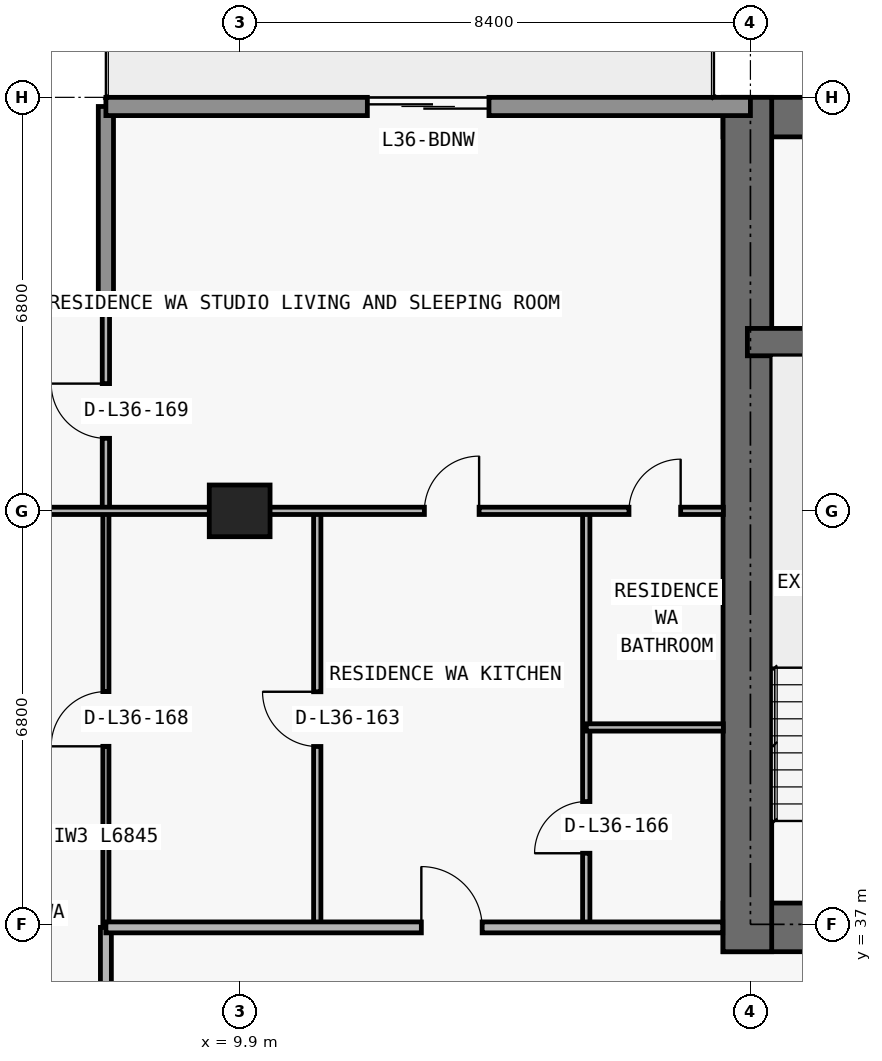
"""IFC4 building model, lengths in metres.
Left out: names, types, materials, properties, quantities, classifications, styles, units other than length and angle.
Written with IfcOpenShell. Run it as: python <this file> out.ifc"""

import sys

from ifc_helpers import new_model, si_unit, direction, frame, frame_2d, origin, origin_2d, place, context, subcontext, project, spatial, rectangle, extrude, element, fill, save


model = new_model("IFC4")
c1 = context("Model", 3, precision=1e-05, world=origin(), true_north=direction((0.0, 1.0)))
c2 = subcontext(c1, "Body", "Model", "MODEL_VIEW")
j1 = project(units=[si_unit("LENGTHUNIT", "METRE"), si_unit("PLANEANGLEUNIT", "RADIAN")], contexts=[c1])
p1 = place(None, origin())
s1 = spatial("IfcSite", under=j1, at=p1, CompositionType="ELEMENT")
p2 = place(p1, origin())
s2 = spatial("IfcBuilding", under=s1, at=p2, CompositionType="ELEMENT")
p3 = place(p2, frame((0.0, 0.0, 132.3)))
s3 = spatial("IfcBuildingStorey", under=s2, at=p3, CompositionType="ELEMENT", Elevation=132.3)
p4 = place(p3, frame((9.9, 43.8, 0.0), z_axis=(0.0, 0.0, 1.0), x_axis=(1.0, 0.0, 0.0)))
e1 = element("IfcColumn", 1, at=p4, inside=s3, PredefinedType="COLUMN", context=c2, shape_type="SweptSolid", body=[
    extrude(rectangle(XDim=1.0, YDim=0.85, at=origin_2d()), origin(), (0.0, 0.0, 1.0), 3.05),
])
p5 = place(p3, frame((17.85, 36.95, 0.0), z_axis=(0.0, 0.0, 1.0), x_axis=(1.0, 0.0, 0.0)))
e2 = element("IfcWall", 2, at=p5, inside=s3, PredefinedType="SHEAR", context=c2, shape_type="SweptSolid", body=[
    extrude(rectangle(XDim=42.1, YDim=0.8, at=frame_2d((21.05, 0.0))), origin(), (0.0, 0.0, 1.0), 3.05),
])
p6 = place(p5, frame((14.45, 0.0, 0.0)))
e3 = element("IfcOpeningElement", 3, at=p6, cuts=e2, PredefinedType="OPENING", context=c2, shape_type="SweptSolid", body=[
    extrude(rectangle(XDim=1.1, YDim=2.15, at=frame_2d((0.55, 1.075))), frame((0.0, 0.41, 0.0), z_axis=(0.0, -1.0, 0.0), x_axis=(1.0, 0.0, 0.0)), (0.0, 0.0, 1.0), 0.82),
])
p7 = place(p5, frame((6.3, 0.0, 0.0)))
e4 = element("IfcOpeningElement", 4, at=p7, cuts=e2, PredefinedType="OPENING", context=c2, shape_type="SweptSolid", body=[
    extrude(rectangle(XDim=1.05, YDim=2.15, at=frame_2d((0.525, 1.075))), frame((0.0, 0.41, 0.0), z_axis=(0.0, -1.0, 0.0), x_axis=(1.0, 0.0, 0.0)), (0.0, 0.0, 1.0), 0.82),
])
p8 = place(p5, frame((34.8, 0.0, 0.0)))
e5 = element("IfcOpeningElement", 5, at=p8, cuts=e2, PredefinedType="OPENING", context=c2, shape_type="SweptSolid", body=[
    extrude(rectangle(XDim=1.05, YDim=2.15, at=frame_2d((0.525, 1.075))), frame((0.0, 0.41, 0.0), z_axis=(0.0, -1.0, 0.0), x_axis=(1.0, 0.0, 0.0)), (0.0, 0.0, 1.0), 0.82),
])
p9 = place(p5, frame((10.913, 0.0, 0.0)))
e6 = element("IfcOpeningElement", 6, at=p9, cuts=e2, PredefinedType="OPENING", context=c2, shape_type="SweptSolid", body=[
    extrude(rectangle(XDim=1.05, YDim=2.15, at=frame_2d((0.525, 1.075))), frame((0.0, 0.41, 0.0), z_axis=(0.0, -1.0, 0.0), x_axis=(1.0, 0.0, 0.0)), (0.0, 0.0, 1.0), 0.82),
])
p10 = place(p5, frame((24.15, 0.0, 0.0)))
e7 = element("IfcOpeningElement", 7, at=p10, cuts=e2, PredefinedType="OPENING", context=c2, shape_type="SweptSolid", body=[
    extrude(rectangle(XDim=1.05, YDim=2.15, at=frame_2d((0.525, 1.075))), frame((0.0, 0.41, 0.0), z_axis=(0.0, -1.0, 0.0), x_axis=(1.0, 0.0, 0.0)), (0.0, 0.0, 1.0), 0.82),
])
p11 = place(p3, frame((17.85, 50.275, 0.0), z_axis=(0.0, 0.0, 1.0), x_axis=(1.0, 0.0, 0.0)))
e8 = element("IfcWall", 8, at=p11, inside=s3, PredefinedType="SHEAR", context=c2, shape_type="SweptSolid", body=[
    extrude(rectangle(XDim=42.1, YDim=0.65, at=frame_2d((21.05, 0.0))), origin(), (0.0, 0.0, 1.0), 3.05),
])
p12 = place(p3, frame((18.25, 36.55, 0.0), z_axis=(0.0, 0.0, 1.0), x_axis=(0.0, 1.0, 0.0)))
e9 = element("IfcWall", 9, at=p12, inside=s3, PredefinedType="SHEAR", context=c2, shape_type="SweptSolid", body=[
    extrude(rectangle(XDim=14.05, YDim=0.8, at=frame_2d((7.025, 0.0))), origin(), (0.0, 0.0, 1.0), 3.05),
])
p13 = place(p3, frame((18.25, 46.575, 0.0), z_axis=(0.0, 0.0, 1.0), x_axis=(1.0, 0.0, 0.0)))
e10 = element("IfcWall", 10, at=p13, inside=s3, PredefinedType="SHEAR", context=c2, shape_type="SweptSolid", body=[
    extrude(rectangle(XDim=41.3, YDim=0.45, at=frame_2d((20.65, 0.0))), origin(), (0.0, 0.0, 1.0), 3.05),
])
p14 = place(p13, frame((7.625, 0.0, 0.0)))
e11 = element("IfcOpeningElement", 11, at=p14, cuts=e10, PredefinedType="OPENING", context=c2, shape_type="SweptSolid", body=[
    extrude(rectangle(XDim=1.05, YDim=2.15, at=frame_2d((0.525, 1.075))), frame((0.0, 0.235, 0.0), z_axis=(0.0, -1.0, 0.0), x_axis=(1.0, 0.0, 0.0)), (0.0, 0.0, 1.0), 0.47),
])
p15 = place(p13, frame((32.675, 0.0, 0.0)))
e12 = element("IfcOpeningElement", 12, at=p15, cuts=e10, PredefinedType="OPENING", context=c2, shape_type="SweptSolid", body=[
    extrude(rectangle(XDim=1.05, YDim=2.15, at=frame_2d((0.525, 1.075))), frame((0.0, 0.235, 0.0), z_axis=(0.0, -1.0, 0.0), x_axis=(1.0, 0.0, 0.0)), (0.0, 0.0, 1.0), 0.47),
])
p16 = place(p3, frame((4.05, 47.2, 0.0), z_axis=(0.0, 0.0, 1.0), x_axis=(1.0, 0.0, 0.0)))
e13 = element("IfcWall", 13, at=p16, inside=s3, PredefinedType="ELEMENTEDWALL", context=c2, shape_type="SweptSolid", body=[
    extrude(rectangle(XDim=3.65, YDim=0.25, at=frame_2d((1.825, 0.0))), origin(), (0.0, 0.0, 1.0), 3.05),
])
p17 = place(p3, frame((7.7, 47.2, 0.0), z_axis=(0.0, 0.0, 1.0), x_axis=(0.0, 1.0, 0.0)))
e14 = element("IfcWall", 14, at=p17, inside=s3, PredefinedType="ELEMENTEDWALL", context=c2, shape_type="SweptSolid", body=[
    extrude(rectangle(XDim=3.25, YDim=0.25, at=frame_2d((1.625, 0.0))), origin(), (0.0, 0.0, 1.0), 3.05),
])
p18 = place(p3, frame((7.7, 50.45, 0.0), z_axis=(0.0, 0.0, 1.0), x_axis=(1.0, 0.0, 0.0)))
e15 = element("IfcWall", 15, at=p18, inside=s3, PredefinedType="STANDARD", context=c2, shape_type="SweptSolid", body=[
    extrude(rectangle(XDim=10.6, YDim=0.3, at=frame_2d((5.3, 0.0))), origin(), (0.0, 0.0, 1.0), 3.05),
])
p19 = place(p18, frame((4.3, 0.0, 0.0)))
e16 = element("IfcOpeningElement", 16, at=p19, cuts=e15, PredefinedType="OPENING", context=c2, shape_type="SweptSolid", body=[
    extrude(rectangle(XDim=2.0, YDim=2.3, at=frame_2d((1.0, 1.15))), frame((0.0, 0.16, 0.0), z_axis=(0.0, -1.0, 0.0), x_axis=(1.0, 0.0, 0.0)), (0.0, 0.0, 1.0), 0.32),
])
p20 = place(p3, frame((7.7, 34.005, 0.0), z_axis=(0.0, 0.0, 1.0), x_axis=(0.0, 1.0, 0.0)))
e17 = element("IfcWall", 17, at=p20, inside=s3, PredefinedType="PARTITIONING", context=c2, shape_type="SweptSolid", body=[
    extrude(rectangle(XDim=2.945, YDim=0.18, at=frame_2d((1.473, 0.0))), origin(), (0.0, 0.0, 1.0), 3.05),
])
p21 = place(p3, frame((7.7, 36.955, 0.0), z_axis=(0.0, 0.0, 1.0), x_axis=(0.0, 1.0, 0.0)))
e18 = element("IfcWall", 18, at=p21, inside=s3, PredefinedType="MOVABLE", context=c2, shape_type="SweptSolid", body=[
    extrude(rectangle(XDim=6.845, YDim=0.1, at=frame_2d((3.422, 0.0))), origin(), (0.0, 0.0, 1.0), 3.05),
])
p22 = place(p21, frame((2.972, 0.0, 0.0)))
e19 = element("IfcOpeningElement", 19, at=p22, cuts=e18, PredefinedType="OPENING", context=c2, shape_type="SweptSolid", body=[
    extrude(rectangle(XDim=0.9, YDim=2.15, at=frame_2d((0.45, 1.075))), frame((0.0, 0.06, 0.0), z_axis=(0.0, -1.0, 0.0), x_axis=(1.0, 0.0, 0.0)), (0.0, 0.0, 1.0), 0.12),
])
p23 = place(p3, frame((7.7, 43.805, 0.0), z_axis=(0.0, 0.0, 1.0), x_axis=(0.0, 1.0, 0.0)))
e20 = element("IfcWall", 20, at=p23, inside=s3, PredefinedType="PARTITIONING", context=c2, shape_type="SweptSolid", body=[
    extrude(rectangle(XDim=3.275, YDim=0.12, at=frame_2d((1.638, 0.0))), origin(), (0.0, 0.0, 1.0), 3.05),
])
p24 = place(p23, frame((1.188, 0.0, 0.0)))
e21 = element("IfcOpeningElement", 21, at=p24, cuts=e20, PredefinedType="OPENING", context=c2, shape_type="SweptSolid", body=[
    extrude(rectangle(XDim=0.9, YDim=2.15, at=frame_2d((0.45, 1.075))), frame((0.0, 0.07, 0.0), z_axis=(0.0, -1.0, 0.0), x_axis=(1.0, 0.0, 0.0)), (0.0, 0.0, 1.0), 0.14),
])
p25 = place(p3, frame((11.176, 36.95, 0.0), z_axis=(0.0, 0.0, 1.0), x_axis=(0.0, 1.0, 0.0)))
e22 = element("IfcWall", 22, at=p25, inside=s3, PredefinedType="PARTITIONING", context=c2, shape_type="SweptSolid", body=[
    extrude(rectangle(XDim=6.85, YDim=0.12, at=frame_2d((3.425, 0.0))), origin(), (0.0, 0.0, 1.0), 3.05),
])
p26 = place(p25, frame((2.975, 0.0, 0.0)))
e23 = element("IfcOpeningElement", 23, at=p26, cuts=e22, PredefinedType="OPENING", context=c2, shape_type="SweptSolid", body=[
    extrude(rectangle(XDim=0.9, YDim=2.15, at=frame_2d((0.45, 1.075))), frame((0.0, 0.07, 0.0), z_axis=(0.0, -1.0, 0.0), x_axis=(1.0, 0.0, 0.0)), (0.0, 0.0, 1.0), 0.14),
])
p27 = place(p3, frame((15.6, 36.95, 0.0), z_axis=(0.0, 0.0, 1.0), x_axis=(0.0, 1.0, 0.0)))
e24 = element("IfcWall", 24, at=p27, inside=s3, PredefinedType="PARTITIONING", context=c2, shape_type="SweptSolid", body=[
    extrude(rectangle(XDim=6.85, YDim=0.12, at=frame_2d((3.425, 0.0))), origin(), (0.0, 0.0, 1.0), 2.578),
])
p28 = place(p27, frame((1.219, 0.0, 0.0)))
e25 = element("IfcOpeningElement", 25, at=p28, cuts=e24, PredefinedType="OPENING", context=c2, shape_type="SweptSolid", body=[
    extrude(rectangle(XDim=0.85, YDim=2.1, at=frame_2d((0.425, 1.05))), frame((0.0, 0.07, 0.0), z_axis=(0.0, -1.0, 0.0), x_axis=(1.0, 0.0, 0.0)), (0.0, 0.0, 1.0), 0.14),
])
p29 = place(p3, frame((7.7, 36.95, 0.0), z_axis=(0.0, 0.0, 1.0), x_axis=(1.0, 0.0, 0.0)))
e26 = element("IfcWall", 26, at=p29, inside=s3, PredefinedType="PARTITIONING", context=c2, shape_type="SweptSolid", body=[
    extrude(rectangle(XDim=10.145, YDim=0.18, at=frame_2d((5.073, 0.0))), origin(), (0.0, 0.0, 1.0), 3.05),
])
p30 = place(p29, frame((5.188, 0.0, 0.0)))
e27 = element("IfcOpeningElement", 27, at=p30, cuts=e26, PredefinedType="OPENING", context=c2, shape_type="SweptSolid", body=[
    extrude(rectangle(XDim=1.0, YDim=2.2, at=frame_2d((0.5, 1.1))), frame((0.0, 0.1, 0.0), z_axis=(0.0, -1.0, 0.0), x_axis=(1.0, 0.0, 0.0)), (0.0, 0.0, 1.0), 0.2),
])
p31 = place(p3, frame((15.6, 40.238, 0.0), z_axis=(0.0, 0.0, 1.0), x_axis=(1.0, 0.0, 0.0)))
e28 = element("IfcWall", 28, at=p31, inside=s3, PredefinedType="PARTITIONING", context=c2, shape_type="SweptSolid", body=[
    extrude(rectangle(XDim=2.255, YDim=0.12, at=frame_2d((1.127, 0.0))), origin(), (0.0, 0.0, 1.0), 3.05),
])
p32 = place(p3, frame((4.195, 43.8, 0.0), z_axis=(0.0, 0.0, 1.0), x_axis=(1.0, 0.0, 0.0)))
e29 = element("IfcWall", 29, at=p32, inside=s3, PredefinedType="PARTITIONING", context=c2, shape_type="SweptSolid", body=[
    extrude(rectangle(XDim=13.66, YDim=0.12, at=frame_2d((6.83, 0.0))), origin(), (0.0, 0.0, 1.0), 2.339),
])
p33 = place(p32, frame((8.743, 0.0, 0.0)))
e30 = element("IfcOpeningElement", 30, at=p33, cuts=e29, PredefinedType="OPENING", context=c2, shape_type="SweptSolid", body=[
    extrude(rectangle(XDim=0.9, YDim=2.15, at=frame_2d((0.45, 1.075))), frame((0.0, 0.07, 0.0), z_axis=(0.0, -1.0, 0.0), x_axis=(1.0, 0.0, 0.0)), (0.0, 0.0, 1.0), 0.14),
])
p34 = place(p32, frame((12.107, 0.0, 0.0)))
e31 = element("IfcOpeningElement", 31, at=p34, cuts=e29, PredefinedType="OPENING", context=c2, shape_type="SweptSolid", body=[
    extrude(rectangle(XDim=0.85, YDim=2.1, at=frame_2d((0.425, 1.05))), frame((0.0, 0.07, 0.0), z_axis=(0.0, -1.0, 0.0), x_axis=(1.0, 0.0, 0.0)), (0.0, 0.0, 1.0), 0.14),
])
p35 = place(p19, origin())
e32 = element("IfcDoor", 32, at=p35, inside=s3, OperationType="DOUBLE_DOOR_SLIDING", PredefinedType="DOOR", context=c2, shape_type="SweptSolid", body=[
    extrude(rectangle(XDim=2.0, YDim=2.3, at=frame_2d((1.0, 1.15))), frame((0.0, 0.025, 0.0), z_axis=(0.0, -1.0, 0.0), x_axis=(1.0, 0.0, 0.0)), (0.0, 0.0, 1.0), 0.05),
])
fill(e16, e32)
p36 = place(p26, origin())
e33 = element("IfcDoor", 33, at=p36, inside=s3, OperationType="SINGLE_SWING_RIGHT", PredefinedType="DOOR", context=c2, shape_type="SweptSolid", body=[
    extrude(rectangle(XDim=0.9, YDim=2.15, at=frame_2d((0.45, 1.075))), frame((0.0, 0.025, 0.0), z_axis=(0.0, -1.0, 0.0), x_axis=(1.0, 0.0, 0.0)), (0.0, 0.0, 1.0), 0.05),
])
fill(e23, e33)
p37 = place(p30, origin())
e34 = element("IfcDoor", 34, at=p37, inside=s3, OperationType="SINGLE_SWING_LEFT", PredefinedType="DOOR", context=c2, shape_type="SweptSolid", body=[
    extrude(rectangle(XDim=1.0, YDim=2.2, at=frame_2d((0.5, 1.1))), frame((0.0, 0.025, 0.0), z_axis=(0.0, -1.0, 0.0), x_axis=(1.0, 0.0, 0.0)), (0.0, 0.0, 1.0), 0.05),
])
fill(e27, e34)
p38 = place(p33, origin())
e35 = element("IfcDoor", 35, at=p38, inside=s3, OperationType="SINGLE_SWING_RIGHT", PredefinedType="DOOR", context=c2, shape_type="SweptSolid", body=[
    extrude(rectangle(XDim=0.9, YDim=2.15, at=frame_2d((0.45, 1.075))), frame((0.0, 0.025, 0.0), z_axis=(0.0, -1.0, 0.0), x_axis=(1.0, 0.0, 0.0)), (0.0, 0.0, 1.0), 0.05),
])
fill(e30, e35)
p39 = place(p28, origin())
e36 = element("IfcDoor", 36, at=p39, inside=s3, OperationType="SINGLE_SWING_LEFT", PredefinedType="DOOR", context=c2, shape_type="SweptSolid", body=[
    extrude(rectangle(XDim=0.85, YDim=2.1, at=frame_2d((0.425, 1.05))), frame((0.0, 0.025, 0.0), z_axis=(0.0, -1.0, 0.0), x_axis=(1.0, 0.0, 0.0)), (0.0, 0.0, 1.0), 0.05),
])
fill(e25, e36)
p40 = place(p34, origin())
e37 = element("IfcDoor", 37, at=p40, inside=s3, OperationType="SINGLE_SWING_RIGHT", PredefinedType="DOOR", context=c2, shape_type="SweptSolid", body=[
    extrude(rectangle(XDim=0.85, YDim=2.1, at=frame_2d((0.425, 1.05))), frame((0.0, 0.025, 0.0), z_axis=(0.0, -1.0, 0.0), x_axis=(1.0, 0.0, 0.0)), (0.0, 0.0, 1.0), 0.05),
])
fill(e31, e37)
p41 = place(p22, origin())
e38 = element("IfcDoor", 38, at=p41, inside=s3, OperationType="SINGLE_SWING_LEFT", PredefinedType="DOOR", context=c2, shape_type="SweptSolid", body=[
    extrude(rectangle(XDim=0.9, YDim=2.15, at=frame_2d((0.45, 1.075))), frame((0.0, 0.025, 0.0), z_axis=(0.0, -1.0, 0.0), x_axis=(1.0, 0.0, 0.0)), (0.0, 0.0, 1.0), 0.05),
])
fill(e19, e38)
p42 = place(p24, origin())
e39 = element("IfcDoor", 39, at=p42, inside=s3, OperationType="SINGLE_SWING_RIGHT", PredefinedType="DOOR", context=c2, shape_type="SweptSolid", body=[
    extrude(rectangle(XDim=0.9, YDim=2.15, at=frame_2d((0.45, 1.075))), frame((0.0, 0.025, 0.0), z_axis=(0.0, -1.0, 0.0), x_axis=(1.0, 0.0, 0.0)), (0.0, 0.0, 1.0), 0.05),
])
fill(e21, e39)
save(model, sys.argv[1])
